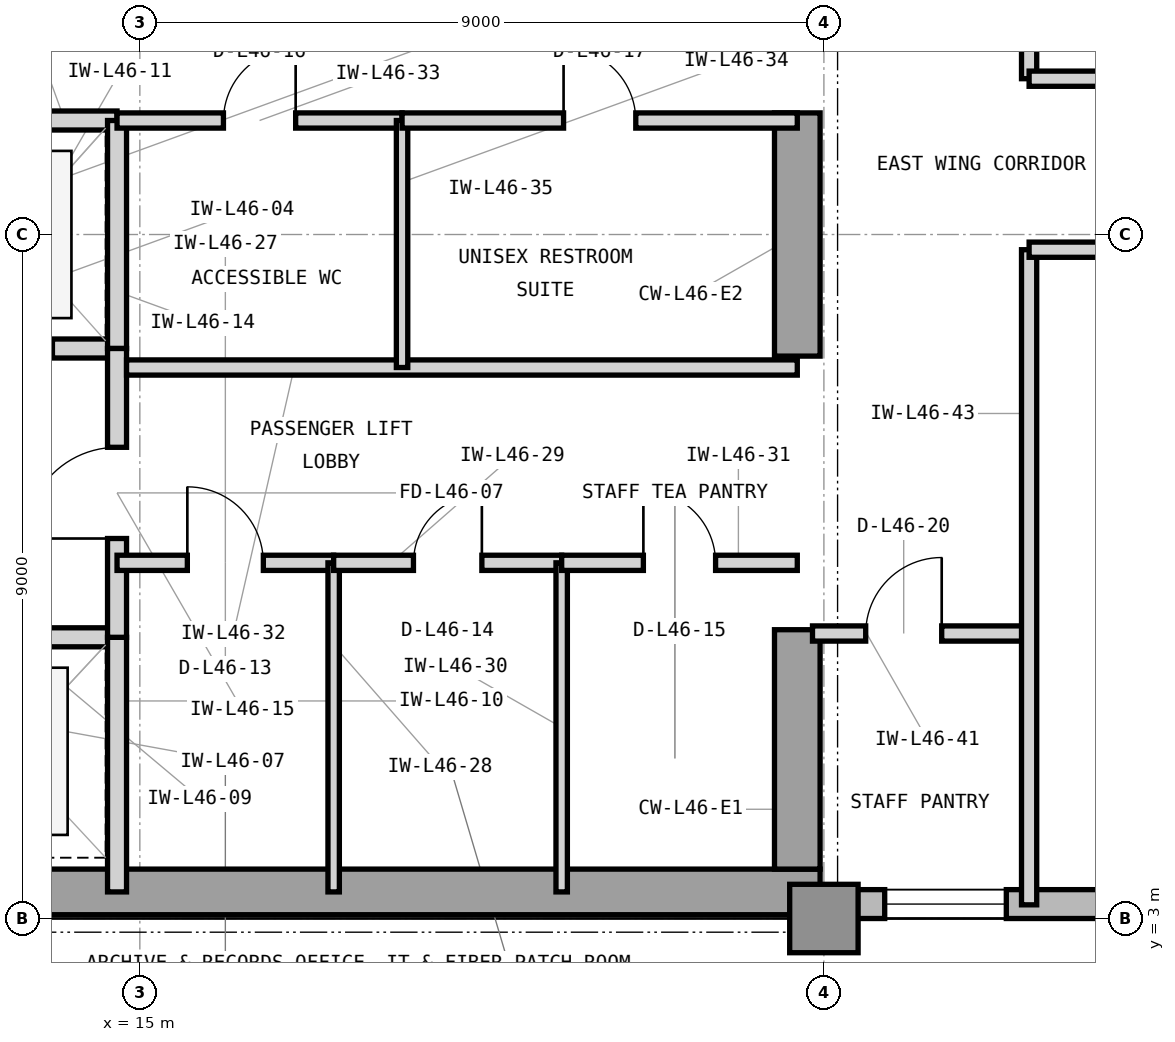
"""IFC4 building model, lengths in metres.
Left out: names, types, materials, properties, quantities, classifications, styles, units other than length and angle.
Written with IfcOpenShell. Run it as: python <this file> out.ifc"""

import sys

from ifc_helpers import new_model, si_unit, direction, frame, frame_2d, origin, origin_2d, place, context, subcontext, project, spatial, rectangle, extrude, element, fill, save


model = new_model("IFC4")
c1 = context("Model", 3, precision=1e-05, world=origin(), true_north=direction((0.0, 1.0)))
c2 = subcontext(c1, "Body", "Model", "MODEL_VIEW")
j1 = project(units=[si_unit("LENGTHUNIT", "METRE"), si_unit("PLANEANGLEUNIT", "RADIAN")], contexts=[c1])
p1 = place(None, origin())
s1 = spatial("IfcSite", under=j1, at=p1, CompositionType="ELEMENT")
p2 = place(p1, origin())
s2 = spatial("IfcBuilding", under=s1, at=p2, CompositionType="ELEMENT")
p3 = place(p2, frame((0.0, 0.0, 191.7)))
s3 = spatial("IfcBuildingStorey", under=s2, at=p3, CompositionType="ELEMENT", Elevation=191.7)
p4 = place(p3, frame((7.475, 3.35, 0.0), z_axis=(0.0, 0.0, 1.0), x_axis=(1.0, 0.0, 0.0)))
e1 = element("IfcWall", 1, at=p4, inside=s3, PredefinedType="SHEAR", context=c2, shape_type="SweptSolid", body=[
    extrude(rectangle(XDim=16.475, YDim=0.6, at=frame_2d((8.237, 0.0))), origin(), (0.0, 0.0, 1.0), 3.9),
])
p5 = place(p3, frame((23.65, 3.65, 0.0), z_axis=(0.0, 0.0, 1.0), x_axis=(0.0, 1.0, 0.0)))
e2 = element("IfcWall", 2, at=p5, inside=s3, PredefinedType="SHEAR", context=c2, shape_type="SweptSolid", body=[
    extrude(rectangle(XDim=3.15, YDim=0.6, at=frame_2d((1.575, 0.0))), origin(), (0.0, 0.0, 1.0), 3.9),
])
p6 = place(p3, frame((23.65, 10.4, 0.0), z_axis=(0.0, 0.0, 1.0), x_axis=(0.0, 1.0, 0.0)))
e3 = element("IfcWall", 3, at=p6, inside=s3, PredefinedType="SHEAR", context=c2, shape_type="SweptSolid", body=[
    extrude(rectangle(XDim=3.2, YDim=0.6, at=frame_2d((1.6, 0.0))), origin(), (0.0, 0.0, 1.0), 3.9),
])
p7 = place(p3, frame((24.0, 3.0, 0.0), z_axis=(0.0, 0.0, 1.0), x_axis=(1.0, 0.0, 0.0)))
e4 = element("IfcColumn", 4, at=p7, inside=s3, PredefinedType="COLUMN", context=c2, shape_type="SweptSolid", body=[
    extrude(rectangle(XDim=0.9, YDim=0.9, at=origin_2d()), origin(), (0.0, 0.0, 1.0), 3.9),
])
p8 = place(p3, frame((23.9, 3.19, 0.0), z_axis=(0.0, 0.0, 1.0), x_axis=(1.0, 0.0, 0.0)))
e5 = element("IfcWall", 5, at=p8, inside=s3, PredefinedType="STANDARD", context=c2, shape_type="SweptSolid", body=[
    extrude(rectangle(XDim=31.5, YDim=0.38, at=frame_2d((15.75, 0.0))), origin(), (0.0, 0.0, 1.0), 3.7),
])
p9 = place(p8, frame((5.6, 0.0, 0.9)))
e6 = element("IfcOpeningElement", 6, at=p9, cuts=e5, PredefinedType="OPENING", context=c2, shape_type="SweptSolid", body=[
    extrude(rectangle(XDim=2.3, YDim=2.2, at=frame_2d((1.15, 1.1))), frame((0.0, 0.2, 0.0), z_axis=(0.0, -1.0, 0.0), x_axis=(1.0, 0.0, 0.0)), (0.0, 0.0, 1.0), 0.4),
])
p10 = place(p8, frame((14.6, 0.0, 0.9)))
e7 = element("IfcOpeningElement", 7, at=p10, cuts=e5, PredefinedType="OPENING", context=c2, shape_type="SweptSolid", body=[
    extrude(rectangle(XDim=2.3, YDim=2.2, at=frame_2d((1.15, 1.1))), frame((0.0, 0.2, 0.0), z_axis=(0.0, -1.0, 0.0), x_axis=(1.0, 0.0, 0.0)), (0.0, 0.0, 1.0), 0.4),
])
p11 = place(p8, frame((0.9, 0.0, 0.9)))
e8 = element("IfcOpeningElement", 8, at=p11, cuts=e5, PredefinedType="OPENING", context=c2, shape_type="SweptSolid", body=[
    extrude(rectangle(XDim=1.6, YDim=2.2, at=frame_2d((0.8, 1.1))), frame((0.0, 0.2, 0.0), z_axis=(0.0, -1.0, 0.0), x_axis=(1.0, 0.0, 0.0)), (0.0, 0.0, 1.0), 0.4),
])
p12 = place(p8, frame((21.704, 0.0, 0.9)))
e9 = element("IfcOpeningElement", 9, at=p12, cuts=e5, PredefinedType="OPENING", context=c2, shape_type="SweptSolid", body=[
    extrude(rectangle(XDim=1.6, YDim=2.2, at=frame_2d((0.8, 1.1))), frame((0.0, 0.2, 0.0), z_axis=(0.0, -1.0, 0.0), x_axis=(1.0, 0.0, 0.0)), (0.0, 0.0, 1.0), 0.4),
])
p13 = place(p3, frame((11.82, 6.7, 0.0), z_axis=(0.0, 0.0, 1.0), x_axis=(1.0, 0.0, 0.0)))
e10 = element("IfcWall", 10, at=p13, inside=s3, PredefinedType="PARTITIONING", context=c2, shape_type="SweptSolid", body=[
    extrude(rectangle(XDim=2.88, YDim=0.25, at=frame_2d((1.44, 0.0))), origin(), (0.0, 0.0, 1.0), 3.283),
])
p14 = place(p13, frame((0.85, 0.0, 0.0)))
e11 = element("IfcOpeningElement", 11, at=p14, cuts=e10, PredefinedType="OPENING", context=c2, shape_type="SweptSolid", body=[
    extrude(rectangle(XDim=1.1, YDim=2.25, at=frame_2d((0.55, 1.125))), frame((0.0, 0.135, 0.0), z_axis=(0.0, -1.0, 0.0), x_axis=(1.0, 0.0, 0.0)), (0.0, 0.0, 1.0), 0.27),
])
p15 = place(p3, frame((14.7, 3.35, 0.0), z_axis=(0.0, 0.0, 1.0), x_axis=(0.0, 1.0, 0.0)))
e12 = element("IfcWall", 12, at=p15, inside=s3, PredefinedType="PARTITIONING", context=c2, shape_type="SweptSolid", body=[
    extrude(rectangle(XDim=3.35, YDim=0.25, at=frame_2d((1.675, 0.0))), origin(), (0.0, 0.0, 1.0), 3.69),
])
p16 = place(p3, frame((11.95, 10.5, 0.0), z_axis=(0.0, 0.0, 1.0), x_axis=(1.0, 0.0, 0.0)))
e13 = element("IfcWall", 13, at=p16, inside=s3, PredefinedType="PARTITIONING", context=c2, shape_type="SweptSolid", body=[
    extrude(rectangle(XDim=2.75, YDim=0.25, at=frame_2d((1.375, 0.0))), origin(), (0.0, 0.0, 1.0), 3.283),
])
p17 = place(p16, frame((0.8, 0.0, 0.0)))
e14 = element("IfcOpeningElement", 14, at=p17, cuts=e13, PredefinedType="OPENING", context=c2, shape_type="SweptSolid", body=[
    extrude(rectangle(XDim=1.1, YDim=2.25, at=frame_2d((0.55, 1.125))), frame((0.0, 0.135, 0.0), z_axis=(0.0, -1.0, 0.0), x_axis=(1.0, 0.0, 0.0)), (0.0, 0.0, 1.0), 0.27),
])
p18 = place(p3, frame((11.95, 13.5, 0.0), z_axis=(0.0, 0.0, 1.0), x_axis=(1.0, 0.0, 0.0)))
e15 = element("IfcWall", 15, at=p18, inside=s3, PredefinedType="PARTITIONING", context=c2, shape_type="SweptSolid", body=[
    extrude(rectangle(XDim=2.75, YDim=0.25, at=frame_2d((1.375, 0.0))), origin(), (0.0, 0.0, 1.0), 3.283),
])
p19 = place(p3, frame((14.7, 10.5, 0.0), z_axis=(0.0, 0.0, 1.0), x_axis=(0.0, 1.0, 0.0)))
e16 = element("IfcWall", 16, at=p19, inside=s3, PredefinedType="PARTITIONING", context=c2, shape_type="SweptSolid", body=[
    extrude(rectangle(XDim=3.0, YDim=0.25, at=frame_2d((1.5, 0.0))), origin(), (0.0, 0.0, 1.0), 3.69),
])
p20 = place(p3, frame((14.7, 6.7, 0.0), z_axis=(0.0, 0.0, 1.0), x_axis=(0.0, 1.0, 0.0)))
e17 = element("IfcWall", 17, at=p20, inside=s3, PredefinedType="PARTITIONING", context=c2, shape_type="SweptSolid", body=[
    extrude(rectangle(XDim=3.8, YDim=0.25, at=frame_2d((1.9, 0.0))), origin(), (0.0, 0.0, 1.0), 3.69),
])
p21 = place(p20, frame((1.3, 0.0, 0.0)))
e18 = element("IfcOpeningElement", 18, at=p21, cuts=e17, PredefinedType="OPENING", context=c2, shape_type="SweptSolid", body=[
    extrude(rectangle(XDim=1.2, YDim=2.2, at=frame_2d((0.6, 1.1))), frame((0.0, 0.135, 0.0), z_axis=(0.0, -1.0, 0.0), x_axis=(1.0, 0.0, 0.0)), (0.0, 0.0, 1.0), 0.27),
])
p22 = place(p3, frame((14.7, 7.68, 0.0), z_axis=(0.0, 0.0, 1.0), x_axis=(1.0, 0.0, 0.0)))
e19 = element("IfcWall", 19, at=p22, inside=s3, PredefinedType="PARTITIONING", context=c2, shape_type="SweptSolid", body=[
    extrude(rectangle(XDim=2.85, YDim=0.2, at=frame_2d((1.425, 0.0))), origin(), (0.0, 0.0, 1.0), 3.69),
])
p23 = place(p22, frame((0.925, 0.0, 0.0)))
e20 = element("IfcOpeningElement", 20, at=p23, cuts=e19, PredefinedType="OPENING", context=c2, shape_type="SweptSolid", body=[
    extrude(rectangle(XDim=1.0, YDim=2.15, at=frame_2d((0.5, 1.075))), frame((0.0, 0.11, 0.0), z_axis=(0.0, -1.0, 0.0), x_axis=(1.0, 0.0, 0.0)), (0.0, 0.0, 1.0), 0.22),
])
p24 = place(p3, frame((17.55, 3.35, 0.0), z_axis=(0.0, 0.0, 1.0), x_axis=(0.0, 1.0, 0.0)))
e21 = element("IfcWall", 21, at=p24, inside=s3, PredefinedType="PARTITIONING", context=c2, shape_type="SweptSolid", body=[
    extrude(rectangle(XDim=4.33, YDim=0.15, at=frame_2d((2.165, 0.0))), origin(), (0.0, 0.0, 1.0), 3.69),
])
p25 = place(p3, frame((17.55, 7.68, 0.0), z_axis=(0.0, 0.0, 1.0), x_axis=(1.0, 0.0, 0.0)))
e22 = element("IfcWall", 22, at=p25, inside=s3, PredefinedType="PARTITIONING", context=c2, shape_type="SweptSolid", body=[
    extrude(rectangle(XDim=3.0, YDim=0.2, at=frame_2d((1.5, 0.0))), origin(), (0.0, 0.0, 1.0), 3.69),
])
p26 = place(p25, frame((1.05, 0.0, 0.0)))
e23 = element("IfcOpeningElement", 23, at=p26, cuts=e22, PredefinedType="OPENING", context=c2, shape_type="SweptSolid", body=[
    extrude(rectangle(XDim=0.9, YDim=2.1, at=frame_2d((0.45, 1.05))), frame((0.0, 0.11, 0.0), z_axis=(0.0, -1.0, 0.0), x_axis=(1.0, 0.0, 0.0)), (0.0, 0.0, 1.0), 0.22),
])
p27 = place(p3, frame((20.55, 3.35, 0.0), z_axis=(0.0, 0.0, 1.0), x_axis=(0.0, 1.0, 0.0)))
e24 = element("IfcWall", 24, at=p27, inside=s3, PredefinedType="PARTITIONING", context=c2, shape_type="SweptSolid", body=[
    extrude(rectangle(XDim=4.33, YDim=0.15, at=frame_2d((2.165, 0.0))), origin(), (0.0, 0.0, 1.0), 3.69),
])
p28 = place(p3, frame((20.55, 7.68, 0.0), z_axis=(0.0, 0.0, 1.0), x_axis=(1.0, 0.0, 0.0)))
e25 = element("IfcWall", 25, at=p28, inside=s3, PredefinedType="PARTITIONING", context=c2, shape_type="SweptSolid", body=[
    extrude(rectangle(XDim=3.1, YDim=0.2, at=frame_2d((1.55, 0.0))), origin(), (0.0, 0.0, 1.0), 3.69),
])
p29 = place(p28, frame((1.075, 0.0, 0.0)))
e26 = element("IfcOpeningElement", 26, at=p29, cuts=e25, PredefinedType="OPENING", context=c2, shape_type="SweptSolid", body=[
    extrude(rectangle(XDim=0.95, YDim=2.1, at=frame_2d((0.475, 1.05))), frame((0.0, 0.11, 0.0), z_axis=(0.0, -1.0, 0.0), x_axis=(1.0, 0.0, 0.0)), (0.0, 0.0, 1.0), 0.22),
])
p30 = place(p3, frame((14.825, 10.25, 0.0), z_axis=(0.0, 0.0, 1.0), x_axis=(1.0, 0.0, 0.0)))
e27 = element("IfcWall", 27, at=p30, inside=s3, PredefinedType="PARTITIONING", context=c2, shape_type="SweptSolid", body=[
    extrude(rectangle(XDim=8.825, YDim=0.2, at=frame_2d((4.413, 0.0))), origin(), (0.0, 0.0, 1.0), 3.69),
])
p31 = place(p3, frame((14.7, 13.5, 0.0), z_axis=(0.0, 0.0, 1.0), x_axis=(1.0, 0.0, 0.0)))
e28 = element("IfcWall", 28, at=p31, inside=s3, PredefinedType="PARTITIONING", context=c2, shape_type="SweptSolid", body=[
    extrude(rectangle(XDim=3.75, YDim=0.2, at=frame_2d((1.875, 0.0))), origin(), (0.0, 0.0, 1.0), 3.283),
])
p32 = place(p31, frame((1.4, 0.0, 0.0)))
e29 = element("IfcOpeningElement", 29, at=p32, cuts=e28, PredefinedType="OPENING", context=c2, shape_type="SweptSolid", body=[
    extrude(rectangle(XDim=0.95, YDim=2.1, at=frame_2d((0.475, 1.05))), frame((0.0, 0.11, 0.0), z_axis=(0.0, -1.0, 0.0), x_axis=(1.0, 0.0, 0.0)), (0.0, 0.0, 1.0), 0.22),
])
p33 = place(p3, frame((18.45, 10.25, 0.0), z_axis=(0.0, 0.0, 1.0), x_axis=(0.0, 1.0, 0.0)))
e30 = element("IfcWall", 30, at=p33, inside=s3, PredefinedType="PARTITIONING", context=c2, shape_type="SweptSolid", body=[
    extrude(rectangle(XDim=3.25, YDim=0.15, at=frame_2d((1.625, 0.0))), origin(), (0.0, 0.0, 1.0), 3.69),
])
p34 = place(p3, frame((18.45, 13.5, 0.0), z_axis=(0.0, 0.0, 1.0), x_axis=(1.0, 0.0, 0.0)))
e31 = element("IfcWall", 31, at=p34, inside=s3, PredefinedType="PARTITIONING", context=c2, shape_type="SweptSolid", body=[
    extrude(rectangle(XDim=5.2, YDim=0.2, at=frame_2d((2.6, 0.0))), origin(), (0.0, 0.0, 1.0), 3.283),
])
p35 = place(p34, frame((2.125, 0.0, 0.0)))
e32 = element("IfcOpeningElement", 32, at=p35, cuts=e31, PredefinedType="OPENING", context=c2, shape_type="SweptSolid", body=[
    extrude(rectangle(XDim=0.95, YDim=2.1, at=frame_2d((0.475, 1.05))), frame((0.0, 0.11, 0.0), z_axis=(0.0, -1.0, 0.0), x_axis=(1.0, 0.0, 0.0)), (0.0, 0.0, 1.0), 0.22),
])
p36 = place(p3, frame((23.85, 6.75, 0.0), z_axis=(0.0, 0.0, 1.0), x_axis=(1.0, 0.0, 0.0)))
e33 = element("IfcWall", 33, at=p36, inside=s3, PredefinedType="PARTITIONING", context=c2, shape_type="SweptSolid", body=[
    extrude(rectangle(XDim=2.85, YDim=0.2, at=frame_2d((1.425, 0.0))), origin(), (0.0, 0.0, 1.0), 3.69),
])
p37 = place(p36, frame((0.7, 0.0, 0.0)))
e34 = element("IfcOpeningElement", 34, at=p37, cuts=e33, PredefinedType="OPENING", context=c2, shape_type="SweptSolid", body=[
    extrude(rectangle(XDim=1.0, YDim=2.15, at=frame_2d((0.5, 1.075))), frame((0.0, 0.11, 0.0), z_axis=(0.0, -1.0, 0.0), x_axis=(1.0, 0.0, 0.0)), (0.0, 0.0, 1.0), 0.22),
])
p38 = place(p3, frame((26.7, 3.18, 0.0), z_axis=(0.0, 0.0, 1.0), x_axis=(0.0, 1.0, 0.0)))
e35 = element("IfcWall", 35, at=p38, inside=s3, PredefinedType="PARTITIONING", context=c2, shape_type="SweptSolid", body=[
    extrude(rectangle(XDim=8.62, YDim=0.2, at=frame_2d((4.31, 0.0))), origin(), (0.0, 0.0, 1.0), 3.69),
])
p39 = place(p3, frame((26.7, 14.05, 0.0), z_axis=(0.0, 0.0, 1.0), x_axis=(0.0, 1.0, 0.0)))
e36 = element("IfcWall", 36, at=p39, inside=s3, PredefinedType="PARTITIONING", context=c2, shape_type="SweptSolid", body=[
    extrude(rectangle(XDim=6.77, YDim=0.2, at=frame_2d((3.385, 0.0))), origin(), (0.0, 0.0, 1.0), 3.69),
])
p40 = place(p3, frame((26.7, 11.8, 0.0), z_axis=(0.0, 0.0, 1.0), x_axis=(1.0, 0.0, 0.0)))
e37 = element("IfcWall", 37, at=p40, inside=s3, PredefinedType="PARTITIONING", context=c2, shape_type="SweptSolid", body=[
    extrude(rectangle(XDim=9.5, YDim=0.2, at=frame_2d((4.75, 0.0))), origin(), (0.0, 0.0, 1.0), 3.69),
])
p41 = place(p40, frame((4.25, 0.0, 0.0)))
e38 = element("IfcOpeningElement", 38, at=p41, cuts=e37, PredefinedType="OPENING", context=c2, shape_type="SweptSolid", body=[
    extrude(rectangle(XDim=1.0, YDim=2.15, at=frame_2d((0.5, 1.075))), frame((0.0, 0.11, 0.0), z_axis=(0.0, -1.0, 0.0), x_axis=(1.0, 0.0, 0.0)), (0.0, 0.0, 1.0), 0.22),
])
p42 = place(p3, frame((26.7, 14.05, 0.0), z_axis=(0.0, 0.0, 1.0), x_axis=(1.0, 0.0, 0.0)))
e39 = element("IfcWall", 39, at=p42, inside=s3, PredefinedType="PARTITIONING", context=c2, shape_type="SweptSolid", body=[
    extrude(rectangle(XDim=8.5, YDim=0.2, at=frame_2d((4.25, 0.0))), origin(), (0.0, 0.0, 1.0), 3.69),
])
p43 = place(p42, frame((3.5, 0.0, 0.0)))
e40 = element("IfcOpeningElement", 40, at=p43, cuts=e39, PredefinedType="OPENING", context=c2, shape_type="SweptSolid", body=[
    extrude(rectangle(XDim=1.5, YDim=2.3, at=frame_2d((0.75, 1.15))), frame((0.0, 0.11, 0.0), z_axis=(0.0, -1.0, 0.0), x_axis=(1.0, 0.0, 0.0)), (0.0, 0.0, 1.0), 0.22),
])
p44 = place(p21, origin())
e41 = element("IfcDoor", 41, at=p44, inside=s3, OperationType="SINGLE_SWING_LEFT", PredefinedType="DOOR", context=c2, shape_type="SweptSolid", body=[
    extrude(rectangle(XDim=1.2, YDim=2.2, at=frame_2d((0.6, 1.1))), frame((0.0, 0.025, 0.0), z_axis=(0.0, -1.0, 0.0), x_axis=(1.0, 0.0, 0.0)), (0.0, 0.0, 1.0), 0.05),
])
fill(e18, e41)
p45 = place(p23, origin())
e42 = element("IfcDoor", 42, at=p45, inside=s3, OperationType="SINGLE_SWING_LEFT", PredefinedType="DOOR", context=c2, shape_type="SweptSolid", body=[
    extrude(rectangle(XDim=1.0, YDim=2.15, at=frame_2d((0.5, 1.075))), frame((0.0, 0.025, 0.0), z_axis=(0.0, -1.0, 0.0), x_axis=(1.0, 0.0, 0.0)), (0.0, 0.0, 1.0), 0.05),
])
fill(e20, e42)
p46 = place(p26, origin())
e43 = element("IfcDoor", 43, at=p46, inside=s3, OperationType="SINGLE_SWING_RIGHT", PredefinedType="TRAPDOOR", context=c2, shape_type="SweptSolid", body=[
    extrude(rectangle(XDim=0.9, YDim=2.1, at=frame_2d((0.45, 1.05))), frame((0.0, 0.025, 0.0), z_axis=(0.0, -1.0, 0.0), x_axis=(1.0, 0.0, 0.0)), (0.0, 0.0, 1.0), 0.05),
])
fill(e23, e43)
p47 = place(p29, origin())
e44 = element("IfcDoor", 44, at=p47, inside=s3, OperationType="SINGLE_SWING_LEFT", PredefinedType="DOOR", context=c2, shape_type="SweptSolid", body=[
    extrude(rectangle(XDim=0.95, YDim=2.1, at=frame_2d((0.475, 1.05))), frame((0.0, 0.025, 0.0), z_axis=(0.0, -1.0, 0.0), x_axis=(1.0, 0.0, 0.0)), (0.0, 0.0, 1.0), 0.05),
])
fill(e26, e44)
p48 = place(p32, origin())
e45 = element("IfcDoor", 45, at=p48, inside=s3, OperationType="SINGLE_SWING_RIGHT", PredefinedType="DOOR", context=c2, shape_type="SweptSolid", body=[
    extrude(rectangle(XDim=0.95, YDim=2.1, at=frame_2d((0.475, 1.05))), frame((0.0, 0.025, 0.0), z_axis=(0.0, -1.0, 0.0), x_axis=(1.0, 0.0, 0.0)), (0.0, 0.0, 1.0), 0.05),
])
fill(e29, e45)
p49 = place(p35, origin())
e46 = element("IfcDoor", 46, at=p49, inside=s3, OperationType="SINGLE_SWING_LEFT", PredefinedType="DOOR", context=c2, shape_type="SweptSolid", body=[
    extrude(rectangle(XDim=0.95, YDim=2.1, at=frame_2d((0.475, 1.05))), frame((0.0, 0.025, 0.0), z_axis=(0.0, -1.0, 0.0), x_axis=(1.0, 0.0, 0.0)), (0.0, 0.0, 1.0), 0.05),
])
fill(e32, e46)
p50 = place(p37, origin())
e47 = element("IfcDoor", 47, at=p50, inside=s3, OperationType="SINGLE_SWING_RIGHT", PredefinedType="DOOR", context=c2, shape_type="SweptSolid", body=[
    extrude(rectangle(XDim=1.0, YDim=2.15, at=frame_2d((0.5, 1.075))), frame((0.0, 0.025, 0.0), z_axis=(0.0, -1.0, 0.0), x_axis=(1.0, 0.0, 0.0)), (0.0, 0.0, 1.0), 0.05),
])
fill(e34, e47)
p51 = place(p11, origin())
e48 = element("IfcWindow", 48, at=p51, inside=s3, PartitioningType="SINGLE_PANEL", PredefinedType="WINDOW", context=c2, shape_type="SweptSolid", body=[
    extrude(rectangle(XDim=1.6, YDim=2.2, at=frame_2d((0.8, 1.1))), frame((0.0, 0.11, 0.0), z_axis=(0.0, -1.0, 0.0), x_axis=(1.0, 0.0, 0.0)), (0.0, 0.0, 1.0), 0.06),
])
fill(e8, e48)
save(model, sys.argv[1])
